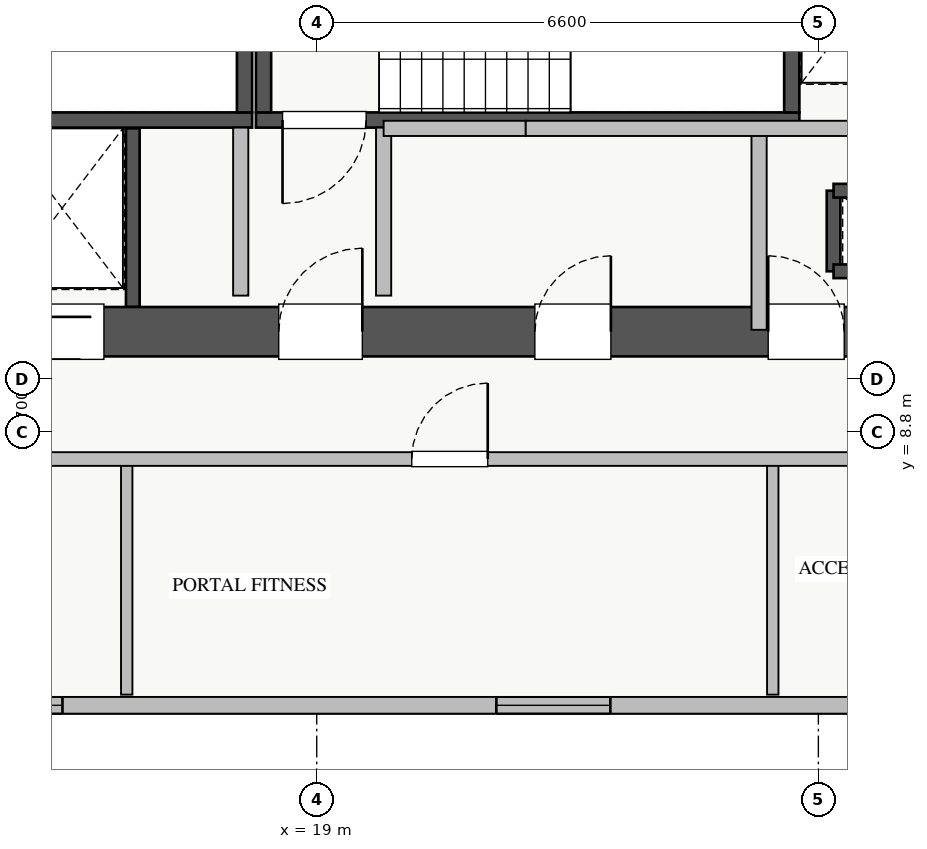
"""IFC4 building model, lengths in metres.
Left out: names, types, materials, properties, quantities, classifications, styles, units other than length and angle.
Written with IfcOpenShell. Run it as: python <this file> out.ifc"""

import sys

from ifc_helpers import new_model, si_unit, direction, frame, frame_2d, origin, place, context, subcontext, project, spatial, rectangle, extrude, source, transform, mapped, element, fill, save


model = new_model("IFC4")
c1 = context("Model", 3, precision=1e-05, world=origin(), true_north=direction((0.0, 1.0)))
c2 = subcontext(c1, "Body", "Model", "MODEL_VIEW")
j1 = project(units=[si_unit("LENGTHUNIT", "METRE"), si_unit("PLANEANGLEUNIT", "RADIAN")], contexts=[c1])
p1 = place(None, origin())
s1 = spatial("IfcSite", under=j1, at=p1, CompositionType="ELEMENT")
p2 = place(p1, origin())
s2 = spatial("IfcBuilding", under=s1, at=p2, CompositionType="ELEMENT")
p3 = place(p2, frame((0.0, 0.0, 156.75)))
s3 = spatial("IfcBuildingStorey", under=s2, at=p3, CompositionType="ELEMENT", Elevation=156.75)
p4 = place(p3, frame((25.8, 10.92, 0.0), z_axis=(0.0, 0.0, 1.0), x_axis=(0.0, 1.0, 0.0)))
e1 = element("IfcWall", 1, at=p4, inside=s3, PredefinedType="SHEAR", context=c2, shape_type="SweptSolid", body=[
    extrude(rectangle(XDim=1.06, YDim=0.18, at=frame_2d((0.53, 0.0))), origin(), (0.0, 0.0, 1.0), 3.07),
])
for number, where, z_axis, x_axis in (
    (2, (25.8, 11.98, 0.0), (0.0, 0.0, 1.0), (1.0, 0.0, 0.0)),
    (3, (25.8, 10.92, 0.0), (0.0, 0.0, 1.0), (1.0, 0.0, 0.0)),
):
    element("IfcWall", number, at=place(p3, frame(where, z_axis=z_axis, x_axis=x_axis)), inside=s3, PredefinedType="SHEAR", context=c2, shape_type="SweptSolid", body=[
        extrude(rectangle(XDim=1.35, YDim=0.18, at=frame_2d((0.675, 0.0))), origin(), (0.0, 0.0, 1.0), 3.07),
    ])
p5 = place(p3, frame((14.62, 12.8, 0.0), z_axis=(0.0, 0.0, 1.0), x_axis=(1.0, 0.0, 0.0)))
e4 = element("IfcWall", 4, at=p5, inside=s3, PredefinedType="SHEAR", context=c2, shape_type="SweptSolid", body=[
    extrude(rectangle(XDim=1.96, YDim=0.18, at=frame_2d((0.98, 0.0))), origin(), (0.0, 0.0, 1.0), 3.07),
])
p6 = place(p3, frame((16.58, 10.45, 0.0), z_axis=(0.0, 0.0, 1.0), x_axis=(0.0, 1.0, 0.0)))
e5 = element("IfcWall", 5, at=p6, inside=s3, PredefinedType="SHEAR", context=c2, shape_type="SweptSolid", body=[
    extrude(rectangle(XDim=2.35, YDim=0.18, at=frame_2d((1.175, 0.0))), origin(), (0.0, 0.0, 1.0), 3.07),
])
p7 = place(p3, frame((10.85, 12.91, 0.0), z_axis=(0.0, 0.0, 1.0), x_axis=(1.0, 0.0, 0.0)))
e6 = element("IfcWall", 6, at=p7, inside=s3, PredefinedType="SHEAR", context=c2, shape_type="SweptSolid", body=[
    extrude(rectangle(XDim=7.3, YDim=0.2, at=frame_2d((3.65, 0.0))), origin(), (0.0, 0.0, 1.0), 3.25),
])
p8 = place(p7, frame((0.35, 0.0, 0.0)))
e7 = element("IfcOpeningElement", 7, at=p8, cuts=e6, PredefinedType="OPENING", context=c2, shape_type="SweptSolid", body=[
    extrude(rectangle(XDim=1.1, YDim=2.05, at=frame_2d((0.55, 1.025))), frame((0.0, 0.11, 0.0), z_axis=(0.0, -1.0, 0.0), x_axis=(1.0, 0.0, 0.0)), (0.0, 0.0, 1.0), 0.22),
])
p9 = place(p3, frame((18.05, 13.01, 0.0), z_axis=(0.0, 0.0, 1.0), x_axis=(0.0, 1.0, 0.0)))
e8 = element("IfcWall", 8, at=p9, inside=s3, PredefinedType="SHEAR", context=c2, shape_type="SweptSolid", body=[
    extrude(rectangle(XDim=2.94, YDim=0.2, at=frame_2d((1.47, 0.0))), origin(), (0.0, 0.0, 1.0), 3.25),
])
p10 = place(p3, frame((18.2, 12.91, 0.0), z_axis=(0.0, 0.0, 1.0), x_axis=(1.0, 0.0, 0.0)))
e9 = element("IfcWall", 9, at=p10, inside=s3, PredefinedType="SHEAR", context=c2, shape_type="SweptSolid", body=[
    extrude(rectangle(XDim=7.15, YDim=0.2, at=frame_2d((3.575, 0.0))), origin(), (0.0, 0.0, 1.0), 3.25),
])
p11 = place(p10, frame((0.35, 0.0, 0.0)))
e10 = element("IfcOpeningElement", 10, at=p11, cuts=e9, PredefinedType="OPENING", context=c2, shape_type="SweptSolid", body=[
    extrude(rectangle(XDim=1.1, YDim=2.05, at=frame_2d((0.55, 1.025))), frame((0.0, 0.11, 0.0), z_axis=(0.0, -1.0, 0.0), x_axis=(1.0, 0.0, 0.0)), (0.0, 0.0, 1.0), 0.22),
])
for number, where, z_axis, x_axis in (
    (11, (18.3, 13.01, 0.0), (0.0, 0.0, 1.0), (0.0, 1.0, 0.0)),
    (12, (25.25, 13.01, 0.0), (0.0, 0.0, 1.0), (0.0, 1.0, 0.0)),
):
    element("IfcWall", number, at=place(p3, frame(where, z_axis=z_axis, x_axis=x_axis)), inside=s3, PredefinedType="SHEAR", context=c2, shape_type="SweptSolid", body=[
        extrude(rectangle(XDim=2.94, YDim=0.2, at=frame_2d((1.47, 0.0))), origin(), (0.0, 0.0, 1.0), 3.25),
    ])
p12 = place(p3, frame((10.2, 10.125, 0.0), z_axis=(0.0, 0.0, 1.0), x_axis=(1.0, 0.0, 0.0)))
e13 = element("IfcWall", 13, at=p12, inside=s3, PredefinedType="SHEAR", context=c2, shape_type="SweptSolid", body=[
    extrude(rectangle(XDim=17.6, YDim=0.65, at=frame_2d((8.8, 0.0))), origin(), (0.0, 0.0, 1.0), 3.25),
])
p13 = place(p12, frame((1.15, 0.0, 0.0)))
e14 = element("IfcOpeningElement", 14, at=p13, cuts=e13, PredefinedType="OPENING", context=c2, shape_type="SweptSolid", body=[
    extrude(rectangle(XDim=1.1, YDim=2.05, at=frame_2d((0.55, 1.025))), frame((0.0, 0.335, 0.0), z_axis=(0.0, -1.0, 0.0), x_axis=(1.0, 0.0, 0.0)), (0.0, 0.0, 1.0), 0.67),
])
p14 = place(p12, frame((8.3, 0.0, 0.0)))
e15 = element("IfcOpeningElement", 15, at=p14, cuts=e13, PredefinedType="OPENING", context=c2, shape_type="SweptSolid", body=[
    extrude(rectangle(XDim=1.1, YDim=2.05, at=frame_2d((0.55, 1.025))), frame((0.0, 0.335, 0.0), z_axis=(0.0, -1.0, 0.0), x_axis=(1.0, 0.0, 0.0)), (0.0, 0.0, 1.0), 0.67),
])
p15 = place(p12, frame((4.9, 0.0, 0.0)))
e16 = element("IfcOpeningElement", 16, at=p15, cuts=e13, PredefinedType="OPENING", context=c2, shape_type="SweptSolid", body=[
    extrude(rectangle(XDim=1.1, YDim=2.05, at=frame_2d((0.55, 1.025))), frame((0.0, 0.335, 0.0), z_axis=(0.0, -1.0, 0.0), x_axis=(1.0, 0.0, 0.0)), (0.0, 0.0, 1.0), 0.67),
])
p16 = place(p12, frame((14.74, 0.0, 0.0)))
e17 = element("IfcOpeningElement", 17, at=p16, cuts=e13, PredefinedType="OPENING", context=c2, shape_type="SweptSolid", body=[
    extrude(rectangle(XDim=1.0, YDim=2.05, at=frame_2d((0.5, 1.025))), frame((0.0, 0.335, 0.0), z_axis=(0.0, -1.0, 0.0), x_axis=(1.0, 0.0, 0.0)), (0.0, 0.0, 1.0), 0.67),
])
p17 = place(p12, frame((11.67, 0.0, 0.0)))
e18 = element("IfcOpeningElement", 18, at=p17, cuts=e13, PredefinedType="OPENING", context=c2, shape_type="SweptSolid", body=[
    extrude(rectangle(XDim=1.0, YDim=2.05, at=frame_2d((0.5, 1.025))), frame((0.0, 0.335, 0.0), z_axis=(0.0, -1.0, 0.0), x_axis=(1.0, 0.0, 0.0)), (0.0, 0.0, 1.0), 0.67),
])
p18 = place(p3, frame((6.55, 5.21, 0.0), z_axis=(0.0, 0.0, 1.0), x_axis=(1.0, 0.0, 0.0)))
e19 = element("IfcWall", 19, at=p18, inside=s3, PredefinedType="STANDARD", context=c2, shape_type="SweptSolid", body=[
    extrude(rectangle(XDim=24.9, YDim=0.22, at=frame_2d((12.45, 0.0))), origin(), (0.0, 0.0, 1.0), 2.61),
])
p19 = place(p18, frame((0.3, 0.0, 0.9)))
e20 = element("IfcOpeningElement", 20, at=p19, cuts=e19, PredefinedType="OPENING", context=c2, shape_type="SweptSolid", body=[
    extrude(rectangle(XDim=1.5, YDim=1.5, at=frame_2d((0.75, 0.75))), frame((0.0, 0.12, 0.0), z_axis=(0.0, -1.0, 0.0), x_axis=(1.0, 0.0, 0.0)), (0.0, 0.0, 1.0), 0.24),
])
p20 = place(p18, frame((7.304, 0.0, 0.9)))
e21 = element("IfcOpeningElement", 21, at=p20, cuts=e19, PredefinedType="OPENING", context=c2, shape_type="SweptSolid", body=[
    extrude(rectangle(XDim=1.8, YDim=1.5, at=frame_2d((0.9, 0.75))), frame((0.0, 0.12, 0.0), z_axis=(0.0, -1.0, 0.0), x_axis=(1.0, 0.0, 0.0)), (0.0, 0.0, 1.0), 0.24),
])
p21 = place(p18, frame((14.813, 0.0, 0.9)))
e22 = element("IfcOpeningElement", 22, at=p21, cuts=e19, PredefinedType="OPENING", context=c2, shape_type="SweptSolid", body=[
    extrude(rectangle(XDim=1.5, YDim=1.45, at=frame_2d((0.75, 0.725))), frame((0.0, 0.12, 0.0), z_axis=(0.0, -1.0, 0.0), x_axis=(1.0, 0.0, 0.0)), (0.0, 0.0, 1.0), 0.24),
])
p22 = place(p18, frame((20.738, 0.0, 0.9)))
e23 = element("IfcOpeningElement", 23, at=p22, cuts=e19, PredefinedType="OPENING", context=c2, shape_type="SweptSolid", body=[
    extrude(rectangle(XDim=2.1, YDim=1.48, at=frame_2d((1.05, 0.74))), frame((0.0, 0.12, 0.0), z_axis=(0.0, -1.0, 0.0), x_axis=(1.0, 0.0, 0.0)), (0.0, 0.0, 1.0), 0.24),
])
p23 = place(p18, frame((4.094, 0.0, 0.9)))
e24 = element("IfcOpeningElement", 24, at=p23, cuts=e19, PredefinedType="OPENING", context=c2, shape_type="SweptSolid", body=[
    extrude(rectangle(XDim=2.4, YDim=1.5, at=frame_2d((1.2, 0.75))), frame((0.0, 0.12, 0.0), z_axis=(0.0, -1.0, 0.0), x_axis=(1.0, 0.0, 0.0)), (0.0, 0.0, 1.0), 0.24),
])
for number, where, z_axis, x_axis in (
    (25, (18.0, 10.6, 0.0), (0.0, 0.0, 1.0), (0.0, 1.0, 0.0)),
    (26, (19.88, 10.6, 0.0), (0.0, 0.0, 1.0), (0.0, 1.0, 0.0)),
):
    element("IfcWall", number, at=place(p3, frame(where, z_axis=z_axis, x_axis=x_axis)), inside=s3, PredefinedType="PARTITIONING", context=c2, shape_type="SweptSolid", body=[
        extrude(rectangle(XDim=2.21, YDim=0.2, at=frame_2d((1.105, 0.0))), origin(), (0.0, 0.0, 1.0), 3.07),
    ])
p24 = place(p3, frame((24.82, 10.15, 0.0), z_axis=(0.0, 0.0, 1.0), x_axis=(0.0, 1.0, 0.0)))
e27 = element("IfcWall", 27, at=p24, inside=s3, PredefinedType="PARTITIONING", context=c2, shape_type="SweptSolid", body=[
    extrude(rectangle(XDim=2.65, YDim=0.2, at=frame_2d((1.325, 0.0))), origin(), (0.0, 0.0, 1.0), 3.07),
])
p25 = place(p3, frame((19.88, 12.8, 0.0), z_axis=(0.0, 0.0, 1.0), x_axis=(1.0, 0.0, 0.0)))
e28 = element("IfcWall", 28, at=p25, inside=s3, PredefinedType="PARTITIONING", context=c2, shape_type="SweptSolid", body=[
    extrude(rectangle(XDim=1.87, YDim=0.2, at=frame_2d((0.935, 0.0))), origin(), (0.0, 0.0, 1.0), 3.07),
])
p26 = place(p3, frame((21.75, 12.8, 0.0), z_axis=(0.0, 0.0, 1.0), x_axis=(1.0, 0.0, 0.0)))
e29 = element("IfcWall", 29, at=p26, inside=s3, PredefinedType="PARTITIONING", context=c2, shape_type="SweptSolid", body=[
    extrude(rectangle(XDim=5.17, YDim=0.2, at=frame_2d((2.585, 0.0))), origin(), (0.0, 0.0, 1.0), 3.07),
])
for number, where, z_axis, x_axis in (
    (30, (16.5, 5.35, 0.0), (0.0, 0.0, 1.0), (0.0, 1.0, 0.0)),
    (31, (25.0, 5.35, 0.0), (0.0, 0.0, 1.0), (0.0, 1.0, 0.0)),
):
    element("IfcWall", number, at=place(p3, frame(where, z_axis=z_axis, x_axis=x_axis)), inside=s3, PredefinedType="PARTITIONING", context=c2, shape_type="SweptSolid", body=[
        extrude(rectangle(XDim=3.1, YDim=0.15, at=frame_2d((1.55, 0.0))), origin(), (0.0, 0.0, 1.0), 3.07),
    ])
p27 = place(p3, frame((8.65, 8.45, 0.0), z_axis=(0.0, 0.0, 1.0), x_axis=(1.0, 0.0, 0.0)))
e32 = element("IfcWall", 32, at=p27, inside=s3, PredefinedType="PARTITIONING", context=c2, shape_type="SweptSolid", body=[
    extrude(rectangle(XDim=23.8, YDim=0.18, at=frame_2d((11.9, 0.0))), origin(), (0.0, 0.0, 1.0), 3.07),
])
p28 = place(p27, frame((3.425, 0.0, 0.0)))
e33 = element("IfcOpeningElement", 33, at=p28, cuts=e32, PredefinedType="OPENING", context=c2, shape_type="SweptSolid", body=[
    extrude(rectangle(XDim=1.0, YDim=2.05, at=frame_2d((0.5, 1.025))), frame((0.0, 0.1, 0.0), z_axis=(0.0, -1.0, 0.0), x_axis=(1.0, 0.0, 0.0)), (0.0, 0.0, 1.0), 0.2),
])
p29 = place(p27, frame((11.6, 0.0, 0.0)))
e34 = element("IfcOpeningElement", 34, at=p29, cuts=e32, PredefinedType="OPENING", context=c2, shape_type="SweptSolid", body=[
    extrude(rectangle(XDim=1.0, YDim=2.05, at=frame_2d((0.5, 1.025))), frame((0.0, 0.1, 0.0), z_axis=(0.0, -1.0, 0.0), x_axis=(1.0, 0.0, 0.0)), (0.0, 0.0, 1.0), 0.2),
])
p30 = place(p27, frame((19.575, 0.0, 0.0)))
e35 = element("IfcOpeningElement", 35, at=p30, cuts=e32, PredefinedType="OPENING", context=c2, shape_type="SweptSolid", body=[
    extrude(rectangle(XDim=1.0, YDim=2.05, at=frame_2d((0.5, 1.025))), frame((0.0, 0.1, 0.0), z_axis=(0.0, -1.0, 0.0), x_axis=(1.0, 0.0, 0.0)), (0.0, 0.0, 1.0), 0.2),
])
m1 = source(origin(), c2, "Body", "SweptSolid", [
    extrude(rectangle(XDim=1.8, YDim=1.5, at=frame_2d((0.9, 0.75))), frame((0.0, 0.03, 0.0), z_axis=(0.0, -1.0, 0.0), x_axis=(1.0, 0.0, 0.0)), (0.0, 0.0, 1.0), 0.06),
])
p31 = place(p20, origin())
e36 = element("IfcWindow", 36, at=p31, inside=s3, PartitioningType="DOUBLE_PANEL_VERTICAL", PredefinedType="WINDOW", context=c2, shape_type="MappedRepresentation", body=[
    mapped(m1, transform((0.0, 0.0, 0.0), x_axis=(1.0, 0.0, 0.0), y_axis=(0.0, 1.0, 0.0), z_axis=(0.0, 0.0, 1.0), scale=1.0)),
])
fill(e21, e36)
m2 = source(origin(), c2, "Body", "SweptSolid", [
    extrude(rectangle(XDim=1.5, YDim=1.45, at=frame_2d((0.75, 0.725))), frame((0.0, 0.03, 0.0), z_axis=(0.0, -1.0, 0.0), x_axis=(1.0, 0.0, 0.0)), (0.0, 0.0, 1.0), 0.06),
])
p32 = place(p21, origin())
e37 = element("IfcWindow", 37, at=p32, inside=s3, PartitioningType="DOUBLE_PANEL_VERTICAL", PredefinedType="WINDOW", context=c2, shape_type="MappedRepresentation", body=[
    mapped(m2, transform((0.0, 0.0, 0.0), x_axis=(1.0, 0.0, 0.0), y_axis=(0.0, 1.0, 0.0), z_axis=(0.0, 0.0, 1.0), scale=1.0)),
])
fill(e22, e37)
m3 = source(origin(), c2, "Body", "SweptSolid", [
    extrude(rectangle(XDim=1.1, YDim=2.05, at=frame_2d((0.55, 1.025))), frame((0.0, 0.025, 0.0), z_axis=(0.0, -1.0, 0.0), x_axis=(1.0, 0.0, 0.0)), (0.0, 0.0, 1.0), 0.05),
])
p33 = place(p14, origin())
e38 = element("IfcDoor", 38, at=p33, inside=s3, OperationType="SINGLE_SWING_RIGHT", PredefinedType="DOOR", context=c2, shape_type="MappedRepresentation", body=[
    mapped(m3, transform((0.0, 0.0, 0.0), x_axis=(1.0, 0.0, 0.0), y_axis=(0.0, 1.0, 0.0), z_axis=(0.0, 0.0, 1.0), scale=1.0)),
])
fill(e15, e38)
p34 = place(p11, frame((1.1, 0.0, 0.0), z_axis=(0.0, 0.0, 1.0), x_axis=(-1.0, 0.0, 0.0)))
e39 = element("IfcDoor", 39, at=p34, inside=s3, OperationType="SINGLE_SWING_LEFT", PredefinedType="DOOR", context=c2, shape_type="MappedRepresentation", body=[
    mapped(m3, transform((0.0, 0.0, 0.0), x_axis=(1.0, 0.0, 0.0), y_axis=(0.0, 1.0, 0.0), z_axis=(0.0, 0.0, 1.0), scale=1.0)),
])
fill(e10, e39)
p35 = place(p15, origin())
e40 = element("IfcDoor", 40, at=p35, inside=s3, OperationType="SLIDING_TO_RIGHT", PredefinedType="DOOR", context=c2, shape_type="MappedRepresentation", body=[
    mapped(m3, transform((0.0, 0.0, 0.0), x_axis=(1.0, 0.0, 0.0), y_axis=(0.0, 1.0, 0.0), z_axis=(0.0, 0.0, 1.0), scale=1.0)),
])
fill(e16, e40)
m4 = source(origin(), c2, "Body", "SweptSolid", [
    extrude(rectangle(XDim=1.0, YDim=2.05, at=frame_2d((0.5, 1.025))), frame((0.0, 0.025, 0.0), z_axis=(0.0, -1.0, 0.0), x_axis=(1.0, 0.0, 0.0)), (0.0, 0.0, 1.0), 0.05),
])
p36 = place(p16, origin())
e41 = element("IfcDoor", 41, at=p36, inside=s3, OperationType="SINGLE_SWING_LEFT", PredefinedType="DOOR", context=c2, shape_type="MappedRepresentation", body=[
    mapped(m4, transform((0.0, 0.0, 0.0), x_axis=(1.0, 0.0, 0.0), y_axis=(0.0, 1.0, 0.0), z_axis=(0.0, 0.0, 1.0), scale=1.0)),
])
fill(e17, e41)
p37 = place(p17, origin())
e42 = element("IfcDoor", 42, at=p37, inside=s3, OperationType="SINGLE_SWING_RIGHT", PredefinedType="DOOR", context=c2, shape_type="MappedRepresentation", body=[
    mapped(m4, transform((0.0, 0.0, 0.0), x_axis=(1.0, 0.0, 0.0), y_axis=(0.0, 1.0, 0.0), z_axis=(0.0, 0.0, 1.0), scale=1.0)),
])
fill(e18, e42)
p38 = place(p29, origin())
e43 = element("IfcDoor", 43, at=p38, inside=s3, OperationType="SINGLE_SWING_RIGHT", PredefinedType="DOOR", context=c2, shape_type="MappedRepresentation", body=[
    mapped(m4, transform((0.0, 0.0, 0.0), x_axis=(1.0, 0.0, 0.0), y_axis=(0.0, 1.0, 0.0), z_axis=(0.0, 0.0, 1.0), scale=1.0)),
])
fill(e34, e43)
save(model, sys.argv[1])
